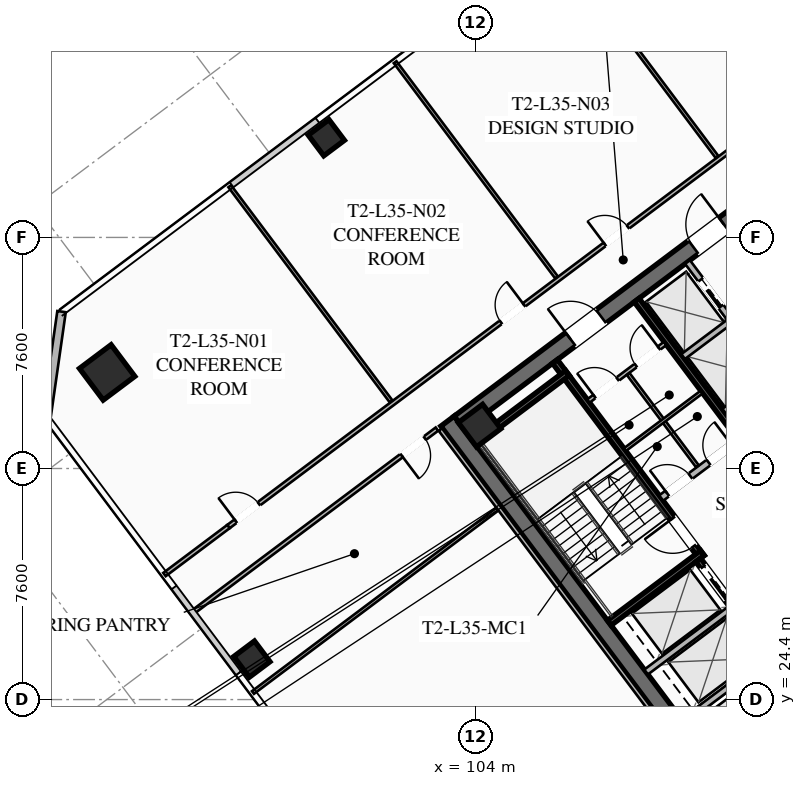
"""IFC4 building model, lengths in metres.
Left out: names, types, materials, properties, quantities, classifications, styles, units other than length and angle.
Written with IfcOpenShell. Run it as: python <this file> out.ifc"""

import sys

from ifc_helpers import new_model, si_unit, direction, frame, frame_2d, origin, origin_2d, place, context, subcontext, project, spatial, rectangle, hollow_rectangle, extrude, element, fill, save


model = new_model("IFC4")
c1 = context("Model", 3, precision=1e-05, world=origin(), true_north=direction((0.0, 1.0)))
c2 = subcontext(c1, "Body", "Model", "MODEL_VIEW")
j1 = project(units=[si_unit("LENGTHUNIT", "METRE"), si_unit("PLANEANGLEUNIT", "RADIAN")], contexts=[c1])
p1 = place(None, origin())
s1 = spatial("IfcSite", under=j1, at=p1, CompositionType="ELEMENT")
p2 = place(p1, origin())
s2 = spatial("IfcBuilding", under=s1, at=p2, CompositionType="ELEMENT")
p3 = place(p2, frame((0.0, 0.0, 132.15)))
s3 = spatial("IfcBuildingStorey", under=s2, at=p3, CompositionType="ELEMENT", Elevation=132.15)
p4 = place(p3, frame((112.436, 21.077, 0.0), z_axis=(0.0, 0.0, 1.0), x_axis=(-0.600005007985, 0.799996243986, 0.0)))
e1 = element("IfcWall", 1, at=p4, inside=s3, PredefinedType="SHEAR", context=c2, shape_type="SweptSolid", body=[
    extrude(rectangle(XDim=15.6, YDim=0.55, at=frame_2d((7.8, 0.0))), origin(), (0.0, 0.0, 1.0), 3.55),
])
p5 = place(p3, frame((103.461, 33.502, 0.0), z_axis=(0.0, 0.0, 1.0), x_axis=(0.799998054672, 0.600002593761, 0.0)))
e2 = element("IfcWall", 2, at=p5, inside=s3, PredefinedType="SHEAR", context=c2, shape_type="SweptSolid", body=[
    extrude(rectangle(XDim=15.06, YDim=0.55, at=frame_2d((7.53, 0.0))), origin(), (0.0, 0.0, 1.0), 3.55),
])
p6 = place(p5, frame((4.58, 0.0, 0.0)))
e3 = element("IfcOpeningElement", 3, at=p6, cuts=e2, PredefinedType="OPENING", context=c2, shape_type="SweptSolid", body=[
    extrude(rectangle(XDim=1.25, YDim=2.25, at=frame_2d((0.625, 1.125))), frame((0.0, 0.285, 0.0), z_axis=(0.0, -1.0, 0.0), x_axis=(1.0, 0.0, 0.0)), (0.0, 0.0, 1.0), 0.57),
])
p7 = place(p5, frame((9.63, 0.0, 0.0)))
e4 = element("IfcOpeningElement", 4, at=p7, cuts=e2, PredefinedType="OPENING", context=c2, shape_type="SweptSolid", body=[
    extrude(rectangle(XDim=1.25, YDim=2.25, at=frame_2d((0.625, 1.125))), frame((0.0, 0.285, 0.0), z_axis=(0.0, -1.0, 0.0), x_axis=(1.0, 0.0, 0.0)), (0.0, 0.0, 1.0), 0.57),
])
p8 = place(p3, frame((104.13, 33.41, 0.0), z_axis=(0.0, 0.0, 1.0), x_axis=(0.799999996291, 0.600000004945, 0.0)))
e5 = element("IfcColumn", 5, at=p8, inside=s3, PredefinedType="COLUMN", context=c2, shape_type="SweptSolid", body=[
    extrude(hollow_rectangle(XDim=1.0, YDim=1.0, WallThickness=0.04, at=origin_2d()), origin(), (0.0, 0.0, 1.0), 3.37),
])
p9 = place(p3, frame((91.88, 35.16, 0.0), z_axis=(0.0, 0.0, 1.0), x_axis=(0.799999996291, 0.600000004945, 0.0)))
e6 = element("IfcColumn", 6, at=p9, inside=s3, PredefinedType="COLUMN", context=c2, shape_type="SweptSolid", body=[
    extrude(hollow_rectangle(XDim=1.3, YDim=1.3, WallThickness=0.05, at=origin_2d()), origin(), (0.0, 0.0, 1.0), 3.37),
])
for number, where, z_axis, x_axis in (
    (7, (99.09, 42.88, 0.0), (0.0, 0.0, 1.0), (0.8, 0.6, 0.0)),
    (8, (96.64, 25.73, 0.0), (0.0, 0.0, 1.0), (0.8, 0.6, 0.0)),
):
    element("IfcColumn", number, at=place(p3, frame(where, z_axis=z_axis, x_axis=x_axis)), inside=s3, PredefinedType="COLUMN", context=c2, shape_type="SweptSolid", body=[
        extrude(hollow_rectangle(XDim=0.85, YDim=0.85, WallThickness=0.035, at=origin_2d()), origin(), (0.0, 0.0, 1.0), 3.37),
    ])
p10 = place(p3, frame((89.88, 33.66, 0.0), z_axis=(0.0, 0.0, 1.0), x_axis=(0.141421356237, 0.989949493661, 0.0)))
e9 = element("IfcWall", 9, at=p10, inside=s3, PredefinedType="SOLIDWALL", context=c2, shape_type="SweptSolid", body=[
    extrude(rectangle(XDim=3.536, YDim=0.28, at=frame_2d((1.768, 0.0))), origin(), (0.0, 0.0, 1.0), 3.37),
])
p11 = place(p3, frame((111.44, 29.08, 0.0), z_axis=(0.0, 0.0, 1.0), x_axis=(-0.59999029481, 0.8000072788, 0.0)))
e10 = element("IfcWall", 10, at=p11, inside=s3, PredefinedType="SHEAR", context=c2, shape_type="SweptSolid", body=[
    extrude(rectangle(XDim=8.05, YDim=0.2, at=frame_2d((4.025, 0.0))), origin(), (0.0, 0.0, 1.0), 3.37),
])
p12 = place(p11, frame((0.45, 0.0, 0.0)))
e11 = element("IfcOpeningElement", 11, at=p12, cuts=e10, PredefinedType="OPENING", context=c2, shape_type="SweptSolid", body=[
    extrude(rectangle(XDim=1.15, YDim=2.2, at=frame_2d((0.575, 1.1))), frame((0.0, 0.11, 0.0), z_axis=(0.0, -1.0, 0.0), x_axis=(1.0, 0.0, 0.0)), (0.0, 0.0, 1.0), 0.22),
])
for number, where, z_axis, x_axis in (
    (12, (108.396, 26.922, 0.0), (0.0, 0.0, 1.0), (0.8, 0.6, 0.0)),
    (13, (103.956, 32.842, 0.0), (0.0, 0.0, 1.0), (0.8, 0.6, 0.0)),
):
    element("IfcWall", number, at=place(p3, frame(where, z_axis=z_axis, x_axis=x_axis)), inside=s3, PredefinedType="SHEAR", context=c2, shape_type="SweptSolid", body=[
        extrude(rectangle(XDim=3.83, YDim=0.2, at=frame_2d((1.915, 0.0))), origin(), (0.0, 0.0, 1.0), 3.37),
    ])
p13 = place(p3, frame((117.998, 25.936, 0.0), z_axis=(0.0, 0.0, 1.0), x_axis=(-0.600002693989, 0.799997979501, 0.0)))
e14 = element("IfcWall", 14, at=p13, inside=s3, PredefinedType="SHEAR", context=c2, shape_type="SweptSolid", body=[
    extrude(rectangle(XDim=14.5, YDim=0.2, at=frame_2d((7.25, 0.0))), origin(), (0.0, 0.0, 1.0), 3.37),
])
p14 = place(p3, frame((110.104, 31.028, 0.0), z_axis=(0.0, 0.0, 1.0), x_axis=(0.800018601094, 0.59997519774, 0.0)))
e15 = element("IfcWall", 15, at=p14, inside=s3, PredefinedType="SOLIDWALL", context=c2, shape_type="SweptSolid", body=[
    extrude(rectangle(XDim=3.15, YDim=0.22, at=frame_2d((1.575, 0.0))), origin(), (0.0, 0.0, 1.0), 2.723),
])
p15 = place(p14, frame((0.25, 0.0, 0.0)))
e16 = element("IfcOpeningElement", 16, at=p15, cuts=e15, PredefinedType="OPENING", context=c2, shape_type="SweptSolid", body=[
    extrude(rectangle(XDim=0.95, YDim=2.05, at=frame_2d((0.475, 1.025))), frame((0.0, 0.12, 0.0), z_axis=(0.0, -1.0, 0.0), x_axis=(1.0, 0.0, 0.0)), (0.0, 0.0, 1.0), 0.24),
])
p16 = place(p14, frame((1.95, 0.0, 0.0)))
e17 = element("IfcOpeningElement", 17, at=p16, cuts=e15, PredefinedType="OPENING", context=c2, shape_type="SweptSolid", body=[
    extrude(rectangle(XDim=0.95, YDim=2.05, at=frame_2d((0.475, 1.025))), frame((0.0, 0.12, 0.0), z_axis=(0.0, -1.0, 0.0), x_axis=(1.0, 0.0, 0.0)), (0.0, 0.0, 1.0), 0.24),
])
p17 = place(p3, frame((115.19, 23.83, 0.0), z_axis=(0.0, 0.0, 1.0), x_axis=(-0.599993943644, 0.800004542231, 0.0)))
e18 = element("IfcWall", 18, at=p17, inside=s3, PredefinedType="SHEAR", context=c2, shape_type="SweptSolid", body=[
    extrude(rectangle(XDim=6.45, YDim=0.2, at=frame_2d((3.225, 0.0))), origin(), (0.0, 0.0, 1.0), 3.37),
])
p18 = place(p17, frame((4.875, 0.0, 0.0)))
e19 = element("IfcOpeningElement", 19, at=p18, cuts=e18, PredefinedType="OPENING", context=c2, shape_type="SweptSolid", body=[
    extrude(rectangle(XDim=1.3, YDim=2.25, at=frame_2d((0.65, 1.125))), frame((0.0, 0.11, 0.0), z_axis=(0.0, -1.0, 0.0), x_axis=(1.0, 0.0, 0.0)), (0.0, 0.0, 1.0), 0.22),
])
p19 = place(p17, frame((2.875, 0.0, 0.0)))
e20 = element("IfcOpeningElement", 20, at=p19, cuts=e18, PredefinedType="OPENING", context=c2, shape_type="SweptSolid", body=[
    extrude(rectangle(XDim=1.3, YDim=2.25, at=frame_2d((0.65, 1.125))), frame((0.0, 0.11, 0.0), z_axis=(0.0, -1.0, 0.0), x_axis=(1.0, 0.0, 0.0)), (0.0, 0.0, 1.0), 0.22),
])
p20 = place(p17, frame((0.675, 0.0, 0.0)))
e21 = element("IfcOpeningElement", 21, at=p20, cuts=e18, PredefinedType="OPENING", context=c2, shape_type="SweptSolid", body=[
    extrude(rectangle(XDim=1.3, YDim=2.25, at=frame_2d((0.65, 1.125))), frame((0.0, 0.11, 0.0), z_axis=(0.0, -1.0, 0.0), x_axis=(1.0, 0.0, 0.0)), (0.0, 0.0, 1.0), 0.22),
])
for number, where, z_axis, x_axis in (
    (22, (110.826, 23.682, 0.0), (0.0, 0.0, 1.0), (0.8, 0.6, 0.0)),
    (23, (109.608, 25.306, 0.0), (0.0, 0.0, 1.0), (0.8, 0.6, 0.0)),
):
    element("IfcWall", number, at=place(p3, frame(where, z_axis=z_axis, x_axis=x_axis)), inside=s3, PredefinedType="SOLIDWALL", context=c2, shape_type="SweptSolid", body=[
        extrude(rectangle(XDim=3.48, YDim=0.2, at=frame_2d((1.74, 0.0))), origin(), (0.0, 0.0, 1.0), 3.37),
    ])
p21 = place(p3, frame((107.71, 34.22, 0.0), z_axis=(0.0, 0.0, 1.0), x_axis=(0.799981399002, 0.60002480053, 0.0)))
e24 = element("IfcWall", 24, at=p21, inside=s3, PredefinedType="PARTITIONING", context=c2, shape_type="SweptSolid", body=[
    extrude(rectangle(XDim=3.15, YDim=0.135, at=frame_2d((1.575, 0.0))), origin(), (0.0, 0.0, 1.0), 2.723),
])
p22 = place(p21, frame((0.25, 0.0, 0.0)))
e25 = element("IfcOpeningElement", 25, at=p22, cuts=e24, PredefinedType="OPENING", context=c2, shape_type="SweptSolid", body=[
    extrude(rectangle(XDim=0.95, YDim=2.05, at=frame_2d((0.475, 1.025))), frame((0.0, 0.077, 0.0), z_axis=(0.0, -1.0, 0.0), x_axis=(1.0, 0.0, 0.0)), (0.0, 0.0, 1.0), 0.155),
])
p23 = place(p21, frame((1.95, 0.0, 0.0)))
e26 = element("IfcOpeningElement", 26, at=p23, cuts=e24, PredefinedType="OPENING", context=c2, shape_type="SweptSolid", body=[
    extrude(rectangle(XDim=0.95, YDim=2.05, at=frame_2d((0.475, 1.025))), frame((0.0, 0.077, 0.0), z_axis=(0.0, -1.0, 0.0), x_axis=(1.0, 0.0, 0.0)), (0.0, 0.0, 1.0), 0.155),
])
p24 = place(p3, frame((111.296, 32.072, 0.0), z_axis=(0.0, 0.0, 1.0), x_axis=(-0.59995887973, 0.800030838552, 0.0)))
e27 = element("IfcWall", 27, at=p24, inside=s3, PredefinedType="PARTITIONING", context=c2, shape_type="SweptSolid", body=[
    extrude(rectangle(XDim=3.8, YDim=0.11, at=frame_2d((1.9, 0.0))), origin(), (0.0, 0.0, 1.0), 2.723),
])
p25 = place(p3, frame((108.91, 32.62, 0.0), z_axis=(0.0, 0.0, 1.0), x_axis=(0.800018601094, 0.59997519774, 0.0)))
e28 = element("IfcWall", 28, at=p25, inside=s3, PredefinedType="PARTITIONING", context=c2, shape_type="SweptSolid", body=[
    extrude(rectangle(XDim=3.15, YDim=0.11, at=frame_2d((1.575, 0.0))), origin(), (0.0, 0.0, 1.0), 2.723),
])
p26 = place(p3, frame((115.11, 33.27, 0.0), z_axis=(0.0, 0.0, 1.0), x_axis=(-0.600011322243, 0.799991508192, 0.0)))
e29 = element("IfcWall", 29, at=p26, inside=s3, PredefinedType="SOLIDWALL", context=c2, shape_type="SweptSolid", body=[
    extrude(rectangle(XDim=6.9, YDim=0.2, at=frame_2d((3.45, 0.0))), origin(), (0.0, 0.0, 1.0), 3.37),
])
p27 = place(p26, frame((0.575, 0.0, 0.0)))
e30 = element("IfcOpeningElement", 30, at=p27, cuts=e29, PredefinedType="OPENING", context=c2, shape_type="SweptSolid", body=[
    extrude(rectangle(XDim=1.1, YDim=2.2, at=frame_2d((0.55, 1.1))), frame((0.0, 0.11, 0.0), z_axis=(0.0, -1.0, 0.0), x_axis=(1.0, 0.0, 0.0)), (0.0, 0.0, 1.0), 0.22),
])
p28 = place(p26, frame((2.825, 0.0, 0.0)))
e31 = element("IfcOpeningElement", 31, at=p28, cuts=e29, PredefinedType="OPENING", context=c2, shape_type="SweptSolid", body=[
    extrude(rectangle(XDim=1.1, YDim=2.2, at=frame_2d((0.55, 1.1))), frame((0.0, 0.11, 0.0), z_axis=(0.0, -1.0, 0.0), x_axis=(1.0, 0.0, 0.0)), (0.0, 0.0, 1.0), 0.22),
])
p29 = place(p26, frame((5.075, 0.0, 0.0)))
e32 = element("IfcOpeningElement", 32, at=p29, cuts=e29, PredefinedType="OPENING", context=c2, shape_type="SweptSolid", body=[
    extrude(rectangle(XDim=1.1, YDim=2.2, at=frame_2d((0.55, 1.1))), frame((0.0, 0.11, 0.0), z_axis=(0.0, -1.0, 0.0), x_axis=(1.0, 0.0, 0.0)), (0.0, 0.0, 1.0), 0.22),
])
p30 = place(p3, frame((112.176, 33.882, 0.0), z_axis=(0.0, 0.0, 1.0), x_axis=(0.8, 0.6, 0.0)))
e33 = element("IfcWall", 33, at=p30, inside=s3, PredefinedType="SOLIDWALL", context=c2, shape_type="SweptSolid", body=[
    extrude(rectangle(XDim=1.88, YDim=0.2, at=frame_2d((0.94, 0.0))), origin(), (0.0, 0.0, 1.0), 3.37),
])
p31 = place(p3, frame((110.826, 35.682, 0.0), z_axis=(0.0, 0.0, 1.0), x_axis=(0.799984418148, 0.600020775241, 0.0)))
e34 = element("IfcWall", 34, at=p31, inside=s3, PredefinedType="SOLIDWALL", context=c2, shape_type="SweptSolid", body=[
    extrude(rectangle(XDim=1.88, YDim=0.2, at=frame_2d((0.94, 0.0))), origin(), (0.0, 0.0, 1.0), 3.37),
])
p32 = place(p3, frame((95.87, 30.09, 0.0), z_axis=(0.0, 0.0, 1.0), x_axis=(0.799997191971, 0.600003744021, 0.0)))
e35 = element("IfcWall", 35, at=p32, inside=s3, PredefinedType="PARTITIONING", context=c2, shape_type="SweptSolid", body=[
    extrude(rectangle(XDim=31.3, YDim=0.135, at=frame_2d((15.65, 0.0))), origin(), (0.0, 0.0, 1.0), 2.723),
])
p33 = place(p32, frame((0.3, 0.0, 0.0)))
e36 = element("IfcOpeningElement", 36, at=p33, cuts=e35, PredefinedType="OPENING", context=c2, shape_type="SweptSolid", body=[
    extrude(rectangle(XDim=0.95, YDim=2.05, at=frame_2d((0.475, 1.025))), frame((0.0, 0.077, 0.0), z_axis=(0.0, -1.0, 0.0), x_axis=(1.0, 0.0, 0.0)), (0.0, 0.0, 1.0), 0.155),
])
p34 = place(p32, frame((11.202, 0.0, 0.0)))
e37 = element("IfcOpeningElement", 37, at=p34, cuts=e35, PredefinedType="OPENING", context=c2, shape_type="SweptSolid", body=[
    extrude(rectangle(XDim=0.95, YDim=2.05, at=frame_2d((0.475, 1.025))), frame((0.0, 0.077, 0.0), z_axis=(0.0, -1.0, 0.0), x_axis=(1.0, 0.0, 0.0)), (0.0, 0.0, 1.0), 0.155),
])
p35 = place(p32, frame((15.474, 0.0, 0.0)))
e38 = element("IfcOpeningElement", 38, at=p35, cuts=e35, PredefinedType="OPENING", context=c2, shape_type="SweptSolid", body=[
    extrude(rectangle(XDim=0.95, YDim=2.05, at=frame_2d((0.475, 1.025))), frame((0.0, 0.077, 0.0), z_axis=(0.0, -1.0, 0.0), x_axis=(1.0, 0.0, 0.0)), (0.0, 0.0, 1.0), 0.155),
])
p36 = place(p32, frame((30.05, 0.0, 0.0)))
e39 = element("IfcOpeningElement", 39, at=p36, cuts=e35, PredefinedType="OPENING", context=c2, shape_type="SweptSolid", body=[
    extrude(rectangle(XDim=0.95, YDim=2.05, at=frame_2d((0.475, 1.025))), frame((0.0, 0.077, 0.0), z_axis=(0.0, -1.0, 0.0), x_axis=(1.0, 0.0, 0.0)), (0.0, 0.0, 1.0), 0.155),
])
p37 = place(p3, frame((93.766, 28.512, 0.0), z_axis=(0.0, 0.0, 1.0), x_axis=(0.799977721118, 0.600029704027, 0.0)))
e40 = element("IfcWall", 40, at=p37, inside=s3, PredefinedType="PARTITIONING", context=c2, shape_type="SweptSolid", body=[
    extrude(rectangle(XDim=2.63, YDim=0.135, at=frame_2d((1.315, 0.0))), origin(), (0.0, 0.0, 1.0), 2.723),
])
p38 = place(p3, frame((101.222, 34.204, 0.0), z_axis=(0.0, 0.0, 1.0), x_axis=(-0.599995586027, 0.800003310461, 0.0)))
e41 = element("IfcWall", 41, at=p38, inside=s3, PredefinedType="PARTITIONING", context=c2, shape_type="SweptSolid", body=[
    extrude(rectangle(XDim=8.85, YDim=0.11, at=frame_2d((4.425, 0.0))), origin(), (0.0, 0.0, 1.0), 2.723),
])
p39 = place(p3, frame((106.662, 38.284, 0.0), z_axis=(0.0, 0.0, 1.0), x_axis=(-0.6, 0.8, 0.0)))
e42 = element("IfcWall", 42, at=p39, inside=s3, PredefinedType="PARTITIONING", context=c2, shape_type="SweptSolid", body=[
    extrude(rectangle(XDim=8.85, YDim=0.11, at=frame_2d((4.425, 0.0))), origin(), (0.0, 0.0, 1.0), 2.723),
])
p40 = place(p3, frame((111.942, 42.244, 0.0), z_axis=(0.0, 0.0, 1.0), x_axis=(-0.599982344389, 0.800013241404, 0.0)))
e43 = element("IfcWall", 43, at=p40, inside=s3, PredefinedType="PARTITIONING", context=c2, shape_type="SweptSolid", body=[
    extrude(rectangle(XDim=8.85, YDim=0.11, at=frame_2d((4.425, 0.0))), origin(), (0.0, 0.0, 1.0), 2.723),
])
p41 = place(p3, frame((132.832, 32.974, 0.0), z_axis=(0.0, 0.0, 1.0), x_axis=(-0.8, -0.6, 0.0)))
e44 = element("IfcWall", 44, at=p41, inside=s3, PredefinedType="PARTITIONING", context=c2, shape_type="SweptSolid", body=[
    extrude(rectangle(XDim=31.3, YDim=0.135, at=frame_2d((15.65, 0.0))), origin(), (0.0, 0.0, 1.0), 2.723),
])
p42 = place(p41, frame((29.97, 0.0, 0.0)))
e45 = element("IfcOpeningElement", 45, at=p42, cuts=e44, PredefinedType="OPENING", context=c2, shape_type="SweptSolid", body=[
    extrude(rectangle(XDim=0.95, YDim=2.05, at=frame_2d((0.475, 1.025))), frame((0.0, 0.077, 0.0), z_axis=(0.0, -1.0, 0.0), x_axis=(1.0, 0.0, 0.0)), (0.0, 0.0, 1.0), 0.155),
])
p43 = place(p41, frame((15.053, 0.0, 0.0)))
e46 = element("IfcOpeningElement", 46, at=p43, cuts=e44, PredefinedType="OPENING", context=c2, shape_type="SweptSolid", body=[
    extrude(rectangle(XDim=0.95, YDim=2.05, at=frame_2d((0.475, 1.025))), frame((0.0, 0.077, 0.0), z_axis=(0.0, -1.0, 0.0), x_axis=(1.0, 0.0, 0.0)), (0.0, 0.0, 1.0), 0.155),
])
p44 = place(p41, frame((0.38, 0.0, 0.0)))
e47 = element("IfcOpeningElement", 47, at=p44, cuts=e44, PredefinedType="OPENING", context=c2, shape_type="SweptSolid", body=[
    extrude(rectangle(XDim=0.95, YDim=2.05, at=frame_2d((0.475, 1.025))), frame((0.0, 0.077, 0.0), z_axis=(0.0, -1.0, 0.0), x_axis=(1.0, 0.0, 0.0)), (0.0, 0.0, 1.0), 0.155),
])
p45 = place(p3, frame((112.104, 20.928, 0.0), z_axis=(0.0, 0.0, 1.0), x_axis=(-0.599994940075, 0.800003794918, 0.0)))
e48 = element("IfcWall", 48, at=p45, inside=s3, PredefinedType="PARTITIONING", context=c2, shape_type="SweptSolid", body=[
    extrude(rectangle(XDim=15.44, YDim=0.135, at=frame_2d((7.72, 0.0))), origin(), (0.0, 0.0, 1.0), 2.723),
])
p46 = place(p3, frame((102.728, 33.296, 0.0), z_axis=(0.0, 0.0, 1.0), x_axis=(-0.800002918023, -0.599996109283, 0.0)))
e49 = element("IfcWall", 49, at=p46, inside=s3, PredefinedType="PARTITIONING", context=c2, shape_type="SweptSolid", body=[
    extrude(rectangle(XDim=10.04, YDim=0.135, at=frame_2d((5.02, 0.0))), origin(), (0.0, 0.0, 1.0), 2.723),
])
p47 = place(p46, frame((0.5, 0.0, 0.0)))
e50 = element("IfcOpeningElement", 50, at=p47, cuts=e49, PredefinedType="OPENING", context=c2, shape_type="SweptSolid", body=[
    extrude(rectangle(XDim=0.95, YDim=2.05, at=frame_2d((0.475, 1.025))), frame((0.0, 0.077, 0.0), z_axis=(0.0, -1.0, 0.0), x_axis=(1.0, 0.0, 0.0)), (0.0, 0.0, 1.0), 0.155),
])
p48 = place(p3, frame((96.676, 24.632, 0.0), z_axis=(0.0, 0.0, 1.0), x_axis=(0.800002918023, 0.599996109283, 0.0)))
e51 = element("IfcWall", 51, at=p48, inside=s3, PredefinedType="PARTITIONING", context=c2, shape_type="SweptSolid", body=[
    extrude(rectangle(XDim=10.04, YDim=0.11, at=frame_2d((5.02, 0.0))), origin(), (0.0, 0.0, 1.0), 2.723),
])
p49 = place(p6, origin())
e52 = element("IfcDoor", 52, at=p49, inside=s3, OperationType="SINGLE_SWING_LEFT", PredefinedType="DOOR", context=c2, shape_type="SweptSolid", body=[
    extrude(rectangle(XDim=1.25, YDim=2.25, at=frame_2d((0.625, 1.125))), frame((0.0, 0.025, 0.0), z_axis=(0.0, -1.0, 0.0), x_axis=(1.0, 0.0, 0.0)), (0.0, 0.0, 1.0), 0.05),
])
fill(e3, e52)
p50 = place(p7, origin())
e53 = element("IfcDoor", 53, at=p50, inside=s3, OperationType="SINGLE_SWING_RIGHT", PredefinedType="DOOR", context=c2, shape_type="SweptSolid", body=[
    extrude(rectangle(XDim=1.25, YDim=2.25, at=frame_2d((0.625, 1.125))), frame((0.0, 0.025, 0.0), z_axis=(0.0, -1.0, 0.0), x_axis=(1.0, 0.0, 0.0)), (0.0, 0.0, 1.0), 0.05),
])
fill(e4, e53)
p51 = place(p12, origin())
e54 = element("IfcDoor", 54, at=p51, inside=s3, OperationType="SINGLE_SWING_RIGHT", PredefinedType="DOOR", context=c2, shape_type="SweptSolid", body=[
    extrude(rectangle(XDim=1.15, YDim=2.2, at=frame_2d((0.575, 1.1))), frame((0.0, 0.025, 0.0), z_axis=(0.0, -1.0, 0.0), x_axis=(1.0, 0.0, 0.0)), (0.0, 0.0, 1.0), 0.05),
])
fill(e11, e54)
p52 = place(p22, origin())
e55 = element("IfcDoor", 55, at=p52, inside=s3, OperationType="SINGLE_SWING_LEFT", PredefinedType="DOOR", context=c2, shape_type="SweptSolid", body=[
    extrude(rectangle(XDim=0.95, YDim=2.05, at=frame_2d((0.475, 1.025))), frame((0.0, 0.025, 0.0), z_axis=(0.0, -1.0, 0.0), x_axis=(1.0, 0.0, 0.0)), (0.0, 0.0, 1.0), 0.05),
])
fill(e25, e55)
p53 = place(p23, origin())
e56 = element("IfcDoor", 56, at=p53, inside=s3, OperationType="SINGLE_SWING_RIGHT", PredefinedType="DOOR", context=c2, shape_type="SweptSolid", body=[
    extrude(rectangle(XDim=0.95, YDim=2.05, at=frame_2d((0.475, 1.025))), frame((0.0, 0.025, 0.0), z_axis=(0.0, -1.0, 0.0), x_axis=(1.0, 0.0, 0.0)), (0.0, 0.0, 1.0), 0.05),
])
fill(e26, e56)
p54 = place(p15, origin())
e57 = element("IfcDoor", 57, at=p54, inside=s3, OperationType="SINGLE_SWING_LEFT", PredefinedType="DOOR", context=c2, shape_type="SweptSolid", body=[
    extrude(rectangle(XDim=0.95, YDim=2.05, at=frame_2d((0.475, 1.025))), frame((0.0, 0.025, 0.0), z_axis=(0.0, -1.0, 0.0), x_axis=(1.0, 0.0, 0.0)), (0.0, 0.0, 1.0), 0.05),
])
fill(e16, e57)
p55 = place(p16, origin())
e58 = element("IfcDoor", 58, at=p55, inside=s3, OperationType="SINGLE_SWING_RIGHT", PredefinedType="DOOR", context=c2, shape_type="SweptSolid", body=[
    extrude(rectangle(XDim=0.95, YDim=2.05, at=frame_2d((0.475, 1.025))), frame((0.0, 0.025, 0.0), z_axis=(0.0, -1.0, 0.0), x_axis=(1.0, 0.0, 0.0)), (0.0, 0.0, 1.0), 0.05),
])
fill(e17, e58)
p56 = place(p33, origin())
e59 = element("IfcDoor", 59, at=p56, inside=s3, OperationType="SINGLE_SWING_LEFT", PredefinedType="DOOR", context=c2, shape_type="SweptSolid", body=[
    extrude(rectangle(XDim=0.95, YDim=2.05, at=frame_2d((0.475, 1.025))), frame((0.0, 0.025, 0.0), z_axis=(0.0, -1.0, 0.0), x_axis=(1.0, 0.0, 0.0)), (0.0, 0.0, 1.0), 0.05),
])
fill(e36, e59)
p57 = place(p34, origin())
e60 = element("IfcDoor", 60, at=p57, inside=s3, OperationType="SINGLE_SWING_RIGHT", PredefinedType="DOOR", context=c2, shape_type="SweptSolid", body=[
    extrude(rectangle(XDim=0.95, YDim=2.05, at=frame_2d((0.475, 1.025))), frame((0.0, 0.025, 0.0), z_axis=(0.0, -1.0, 0.0), x_axis=(1.0, 0.0, 0.0)), (0.0, 0.0, 1.0), 0.05),
])
fill(e37, e60)
p58 = place(p35, origin())
e61 = element("IfcDoor", 61, at=p58, inside=s3, OperationType="SINGLE_SWING_LEFT", PredefinedType="DOOR", context=c2, shape_type="SweptSolid", body=[
    extrude(rectangle(XDim=0.95, YDim=2.05, at=frame_2d((0.475, 1.025))), frame((0.0, 0.025, 0.0), z_axis=(0.0, -1.0, 0.0), x_axis=(1.0, 0.0, 0.0)), (0.0, 0.0, 1.0), 0.05),
])
fill(e38, e61)
p59 = place(p47, origin())
e62 = element("IfcDoor", 62, at=p59, inside=s3, OperationType="SINGLE_SWING_RIGHT", PredefinedType="DOOR", context=c2, shape_type="SweptSolid", body=[
    extrude(rectangle(XDim=0.95, YDim=2.05, at=frame_2d((0.475, 1.025))), frame((0.0, 0.025, 0.0), z_axis=(0.0, -1.0, 0.0), x_axis=(1.0, 0.0, 0.0)), (0.0, 0.0, 1.0), 0.05),
])
fill(e50, e62)
p60 = place(p18, origin())
e63 = element("IfcDoor", 63, at=p60, inside=s3, OperationType="SLIDING_TO_LEFT", PredefinedType="DOOR", context=c2, shape_type="SweptSolid", body=[
    extrude(rectangle(XDim=1.3, YDim=2.25, at=frame_2d((0.65, 1.125))), frame((0.0, 0.025, 0.0), z_axis=(0.0, -1.0, 0.0), x_axis=(1.0, 0.0, 0.0)), (0.0, 0.0, 1.0), 0.05),
])
fill(e19, e63)
p61 = place(p29, origin())
e64 = element("IfcDoor", 64, at=p61, inside=s3, OperationType="SLIDING_TO_LEFT", PredefinedType="DOOR", context=c2, shape_type="SweptSolid", body=[
    extrude(rectangle(XDim=1.1, YDim=2.2, at=frame_2d((0.55, 1.1))), frame((0.0, 0.025, 0.0), z_axis=(0.0, -1.0, 0.0), x_axis=(1.0, 0.0, 0.0)), (0.0, 0.0, 1.0), 0.05),
])
fill(e32, e64)
save(model, sys.argv[1])
